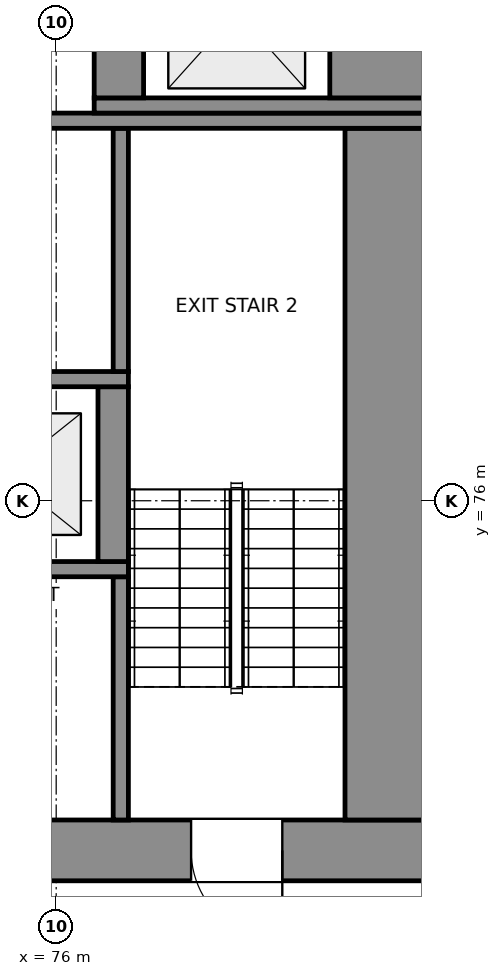
"""IFC4 building model, lengths in metres.
Left out: names, types, materials, properties, quantities, classifications, styles, units other than length and angle.
Written with IfcOpenShell. Run it as: python <this file> out.ifc"""

import sys

from ifc_helpers import new_model, si_unit, direction, frame, frame_2d, origin, place, context, subcontext, project, spatial, rectangle, extrude, element, fill, save


model = new_model("IFC4")
c1 = context("Model", 3, precision=1e-05, world=origin(), true_north=direction((0.0, 1.0)))
c2 = subcontext(c1, "Body", "Model", "MODEL_VIEW")
j1 = project(units=[si_unit("LENGTHUNIT", "METRE"), si_unit("PLANEANGLEUNIT", "RADIAN")], contexts=[c1])
p1 = place(None, origin())
s1 = spatial("IfcSite", under=j1, at=p1, CompositionType="ELEMENT")
p2 = place(p1, origin())
s2 = spatial("IfcBuilding", under=s1, at=p2, CompositionType="ELEMENT")
p3 = place(p2, frame((0.0, 0.0, 204.3)))
s3 = spatial("IfcBuildingStorey", under=s2, at=p3, CompositionType="ELEMENT", Elevation=204.3)
p4 = place(p3, frame((59.0, 71.4, 0.0), z_axis=(0.0, 0.0, 1.0), x_axis=(1.0, 0.0, 0.0)))
e1 = element("IfcWall", 1, at=p4, inside=s3, PredefinedType="SHEAR", context=c2, shape_type="SweptSolid", body=[
    extrude(rectangle(XDim=22.0, YDim=0.8, at=frame_2d((11.0, 0.0))), origin(), (0.0, 0.0, 1.0), 3.9),
])
p5 = place(p4, frame((2.025, 0.0, 0.0)))
e2 = element("IfcOpeningElement", 2, at=p5, cuts=e1, PredefinedType="OPENING", context=c2, shape_type="SweptSolid", body=[
    extrude(rectangle(XDim=1.2, YDim=2.1, at=frame_2d((0.6, 1.05))), frame((0.0, 0.41, 0.0), z_axis=(0.0, -1.0, 0.0), x_axis=(1.0, 0.0, 0.0)), (0.0, 0.0, 1.0), 0.82),
])
p6 = place(p4, frame((18.775, 0.0, 0.0)))
e3 = element("IfcOpeningElement", 3, at=p6, cuts=e1, PredefinedType="OPENING", context=c2, shape_type="SweptSolid", body=[
    extrude(rectangle(XDim=1.2, YDim=2.1, at=frame_2d((0.6, 1.05))), frame((0.0, 0.41, 0.0), z_axis=(0.0, -1.0, 0.0), x_axis=(1.0, 0.0, 0.0)), (0.0, 0.0, 1.0), 0.82),
])
p7 = place(p4, frame((10.0, 0.0, 0.0)))
e4 = element("IfcOpeningElement", 4, at=p7, cuts=e1, PredefinedType="OPENING", context=c2, shape_type="SweptSolid", body=[
    extrude(rectangle(XDim=2.0, YDim=2.1, at=frame_2d((1.0, 1.05))), frame((0.0, 0.41, 0.0), z_axis=(0.0, -1.0, 0.0), x_axis=(1.0, 0.0, 0.0)), (0.0, 0.0, 1.0), 0.82),
])
p8 = place(p3, frame((76.85, 71.8, 0.0), z_axis=(0.0, 0.0, 1.0), x_axis=(0.0, 1.0, 0.0)))
e5 = element("IfcWall", 5, at=p8, inside=s3, PredefinedType="SHEAR", context=c2, shape_type="SweptSolid", body=[
    extrude(rectangle(XDim=3.2, YDim=0.2, at=frame_2d((1.6, 0.0))), origin(), (0.0, 0.0, 1.0), 3.9),
])
p9 = place(p3, frame((80.4, 71.8, 0.0), z_axis=(0.0, 0.0, 1.0), x_axis=(0.0, 1.0, 0.0)))
e6 = element("IfcWall", 6, at=p9, inside=s3, PredefinedType="SHEAR", context=c2, shape_type="SweptSolid", body=[
    extrude(rectangle(XDim=9.1, YDim=1.2, at=frame_2d((4.55, 0.0))), origin(), (0.0, 0.0, 1.0), 3.9),
])
p10 = place(p3, frame((71.25, 75.1, 0.0), z_axis=(0.0, 0.0, 1.0), x_axis=(1.0, 0.0, 0.0)))
e7 = element("IfcWall", 7, at=p10, inside=s3, PredefinedType="SHEAR", context=c2, shape_type="SweptSolid", body=[
    extrude(rectangle(XDim=5.7, YDim=0.2, at=frame_2d((2.85, 0.0))), origin(), (0.0, 0.0, 1.0), 3.9),
])
p11 = place(p3, frame((76.75, 75.2, 0.0), z_axis=(0.0, 0.0, 1.0), x_axis=(0.0, 1.0, 0.0)))
e8 = element("IfcWall", 8, at=p11, inside=s3, PredefinedType="SHEAR", context=c2, shape_type="SweptSolid", body=[
    extrude(rectangle(XDim=2.3, YDim=0.4, at=frame_2d((1.15, 0.0))), origin(), (0.0, 0.0, 1.0), 3.9),
])
p12 = place(p3, frame((71.25, 77.6, 0.0), z_axis=(0.0, 0.0, 1.0), x_axis=(1.0, 0.0, 0.0)))
e9 = element("IfcWall", 9, at=p12, inside=s3, PredefinedType="SHEAR", context=c2, shape_type="SweptSolid", body=[
    extrude(rectangle(XDim=5.7, YDim=0.2, at=frame_2d((2.85, 0.0))), origin(), (0.0, 0.0, 1.0), 3.9),
])
p13 = place(p12, frame((0.875, 0.0, 0.0)))
e10 = element("IfcOpeningElement", 10, at=p13, cuts=e9, PredefinedType="OPENING", context=c2, shape_type="SweptSolid", body=[
    extrude(rectangle(XDim=1.1, YDim=2.1, at=frame_2d((0.55, 1.05))), frame((0.0, 0.11, 0.0), z_axis=(0.0, -1.0, 0.0), x_axis=(1.0, 0.0, 0.0)), (0.0, 0.0, 1.0), 0.22),
])
p14 = place(p12, frame((3.525, 0.0, 0.0)))
e11 = element("IfcOpeningElement", 11, at=p14, cuts=e9, PredefinedType="OPENING", context=c2, shape_type="SweptSolid", body=[
    extrude(rectangle(XDim=1.1, YDim=2.1, at=frame_2d((0.55, 1.05))), frame((0.0, 0.11, 0.0), z_axis=(0.0, -1.0, 0.0), x_axis=(1.0, 0.0, 0.0)), (0.0, 0.0, 1.0), 0.22),
])
p15 = place(p3, frame((76.85, 77.7, 0.0), z_axis=(0.0, 0.0, 1.0), x_axis=(0.0, 1.0, 0.0)))
e12 = element("IfcWall", 12, at=p15, inside=s3, PredefinedType="SHEAR", context=c2, shape_type="SweptSolid", body=[
    extrude(rectangle(XDim=3.2, YDim=0.2, at=frame_2d((1.6, 0.0))), origin(), (0.0, 0.0, 1.0), 3.9),
])
p16 = place(p3, frame((59.0, 81.0, 0.0), z_axis=(0.0, 0.0, 1.0), x_axis=(1.0, 0.0, 0.0)))
e13 = element("IfcWall", 13, at=p16, inside=s3, PredefinedType="SHEAR", context=c2, shape_type="SweptSolid", body=[
    extrude(rectangle(XDim=22.0, YDim=0.2, at=frame_2d((11.0, 0.0))), origin(), (0.0, 0.0, 1.0), 3.9),
])
p17 = place(p16, frame((11.85, 0.0, 0.0)))
e14 = element("IfcOpeningElement", 14, at=p17, cuts=e13, PredefinedType="OPENING", context=c2, shape_type="SweptSolid", body=[
    extrude(rectangle(XDim=0.9, YDim=2.1, at=frame_2d((0.45, 1.05))), frame((0.0, 0.11, 0.0), z_axis=(0.0, -1.0, 0.0), x_axis=(1.0, 0.0, 0.0)), (0.0, 0.0, 1.0), 0.22),
])
p18 = place(p3, frame((76.5, 81.2, 0.0), z_axis=(0.0, 0.0, 1.0), x_axis=(1.0, 0.0, 0.0)))
e15 = element("IfcWall", 15, at=p18, inside=s3, PredefinedType="SHEAR", context=c2, shape_type="SweptSolid", body=[
    extrude(rectangle(XDim=4.5, YDim=0.2, at=frame_2d((2.25, 0.0))), origin(), (0.0, 0.0, 1.0), 3.9),
])
p19 = place(p3, frame((76.825, 81.3, 0.0), z_axis=(0.0, 0.0, 1.0), x_axis=(0.0, 1.0, 0.0)))
e16 = element("IfcWall", 16, at=p19, inside=s3, PredefinedType="SHEAR", context=c2, shape_type="SweptSolid", body=[
    extrude(rectangle(XDim=2.25, YDim=0.65, at=frame_2d((1.125, 0.0))), origin(), (0.0, 0.0, 1.0), 3.9),
])
p20 = place(p3, frame((80.3, 81.3, 0.0), z_axis=(0.0, 0.0, 1.0), x_axis=(0.0, 1.0, 0.0)))
e17 = element("IfcWall", 17, at=p20, inside=s3, PredefinedType="SHEAR", context=c2, shape_type="SweptSolid", body=[
    extrude(rectangle(XDim=2.25, YDim=1.4, at=frame_2d((1.125, 0.0))), origin(), (0.0, 0.0, 1.0), 3.9),
])
p21 = place(p6, frame((1.2, 0.0, 0.0), z_axis=(0.0, 0.0, 1.0), x_axis=(-1.0, 0.0, 0.0)))
e18 = element("IfcDoor", 18, at=p21, inside=s3, OperationType="SINGLE_SWING_LEFT", PredefinedType="DOOR", context=c2, shape_type="SweptSolid", body=[
    extrude(rectangle(XDim=1.2, YDim=2.1, at=frame_2d((0.6, 1.05))), frame((0.0, 0.025, 0.0), z_axis=(0.0, -1.0, 0.0), x_axis=(1.0, 0.0, 0.0)), (0.0, 0.0, 1.0), 0.05),
])
fill(e3, e18)
save(model, sys.argv[1])
